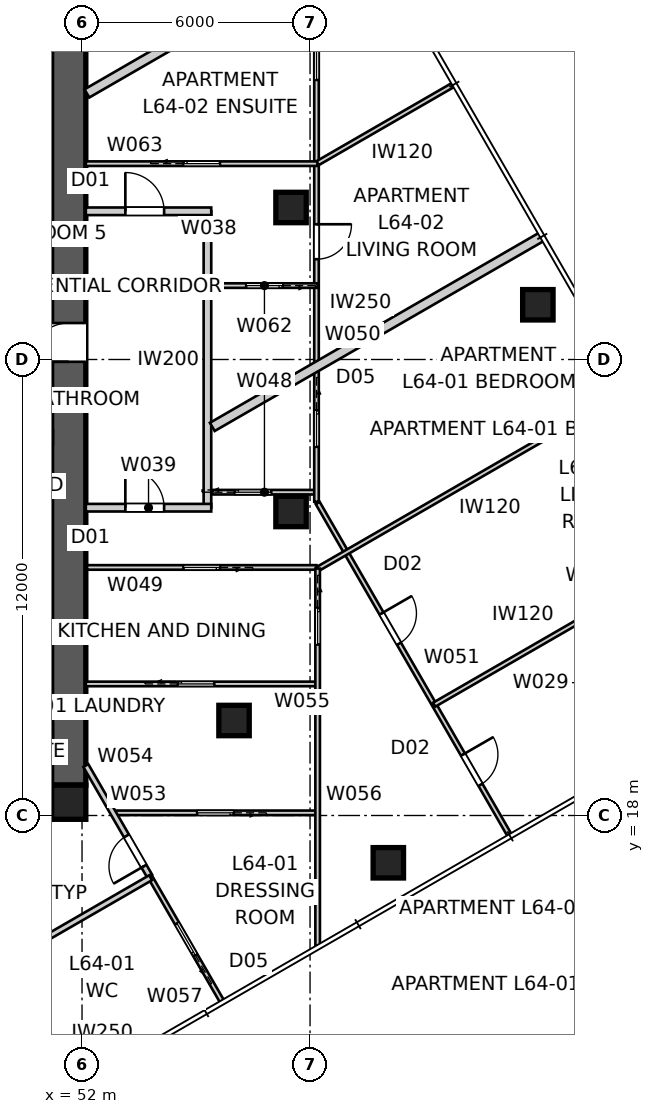
"""IFC4 building model, lengths in metres.
Left out: names, types, materials, properties, quantities, classifications, styles, units other than length and angle.
Written with IfcOpenShell. Run it as: python <this file> out.ifc"""

import sys

from ifc_helpers import new_model, si_unit, direction, frame, frame_2d, origin, origin_2d, place, context, subcontext, project, spatial, polyline, rectangle, outline, extrude, element, fill, save


model = new_model("IFC4")
c1 = context("Model", 3, precision=1e-05, world=origin(), true_north=direction((0.0, 1.0)))
c2 = subcontext(c1, "Body", "Model", "MODEL_VIEW")
j1 = project(units=[si_unit("LENGTHUNIT", "METRE"), si_unit("PLANEANGLEUNIT", "RADIAN")], contexts=[c1])
p1 = place(None, origin())
s1 = spatial("IfcSite", under=j1, at=p1, CompositionType="ELEMENT")
p2 = place(p1, origin())
s2 = spatial("IfcBuilding", under=s1, at=p2, CompositionType="ELEMENT")
p3 = place(p2, frame((0.0, 0.0, 232.0)))
s3 = spatial("IfcBuildingStorey", under=s2, at=p3, CompositionType="ELEMENT", Elevation=232.0)
p4 = place(p3, frame((51.2, 18.35, 0.0), z_axis=(0.0, 0.0, 1.0), x_axis=(-1.0, 0.0, 0.0)))
e1 = element("IfcWall", 1, at=p4, inside=s3, PredefinedType="SHEAR", context=c2, shape_type="SweptSolid", body=[
    extrude(outline(polyline([(0.0, -0.45), (22.4, -0.45), (22.4, -0.025), (22.85, -0.025), (22.85, 0.025), (22.4, 0.025), (22.4, 0.45), (0.0, 0.45), (0.0, 0.025), (-0.45, 0.025), (-0.45, -0.025), (0.0, -0.025), (0.0, -0.45)])), origin(), (0.0, 0.0, 1.0), 3.4),
])
p5 = place(p3, frame((51.65, 18.8, 0.0), z_axis=(0.0, 0.0, 1.0), x_axis=(0.0, 1.0, 0.0)))
e2 = element("IfcWall", 2, at=p5, inside=s3, PredefinedType="SHEAR", context=c2, shape_type="SweptSolid", body=[
    extrude(outline(polyline([(0.0, -0.45), (22.4, -0.45), (22.4, -0.025), (22.85, -0.025), (22.85, 0.025), (22.4, 0.025), (22.4, 0.45), (0.0, 0.45), (0.0, 0.025), (-0.45, 0.025), (-0.45, -0.025), (0.0, -0.025), (0.0, -0.45)])), origin(), (0.0, 0.0, 1.0), 3.4),
])
p6 = place(p5, frame((11.14, 0.0, 0.0)))
e3 = element("IfcOpeningElement", 3, at=p6, cuts=e2, PredefinedType="OPENING", context=c2, shape_type="SweptSolid", body=[
    extrude(rectangle(XDim=1.02, YDim=2.4, at=frame_2d((0.51, 1.2))), frame((0.0, 0.46, 0.0), z_axis=(0.0, -1.0, 0.0), x_axis=(1.0, 0.0, 0.0)), (0.0, 0.0, 1.0), 0.92),
])
p7 = place(p3, frame((51.65, 18.35, 0.0), z_axis=(0.0, 0.0, 1.0), x_axis=(1.0, 0.0, 0.0)))
e4 = element("IfcColumn", 4, at=p7, inside=s3, PredefinedType="COLUMN", context=c2, shape_type="SweptSolid", body=[
    extrude(rectangle(XDim=0.9, YDim=0.9, at=origin_2d()), origin(), (0.0, 0.0, 1.0), 3.4),
])
for number, where, z_axis, x_axis in (
    (5, (60.06, 16.755, 0.0), (0.0, 0.0, 1.0), (1.0, 0.0, 0.0)),
    (6, (63.995, 31.44, 0.0), (0.0, 0.0, 1.0), (1.0, 0.0, 0.0)),
):
    element("IfcColumn", number, at=place(p3, frame(where, z_axis=z_axis, x_axis=x_axis)), inside=s3, PredefinedType="COLUMN", context=c2, shape_type="SweptSolid", body=[
        extrude(rectangle(XDim=0.8, YDim=0.8, at=origin_2d()), origin(), (0.0, 0.0, 1.0), 3.2),
    ])
for number, where, z_axis, x_axis in (
    (7, (57.5, 26.0, 0.0), (0.0, 0.0, 1.0), (1.0, 0.0, 0.0)),
    (8, (57.5, 34.0, 0.0), (0.0, 0.0, 1.0), (1.0, 0.0, 0.0)),
    (9, (56.0, 20.5, 0.0), (0.0, 0.0, 1.0), (1.0, 0.0, 0.0)),
):
    element("IfcColumn", number, at=place(p3, frame(where, z_axis=z_axis, x_axis=x_axis)), inside=s3, PredefinedType="COLUMN", context=c2, shape_type="SweptSolid", body=[
        extrude(rectangle(XDim=0.8, YDim=0.8, at=origin_2d()), origin(), (0.0, 0.0, 1.0), 3.4),
    ])
p8 = place(p3, frame((55.3, 26.1, 0.0), z_axis=(0.0, 0.0, 1.0), x_axis=(0.0, 1.0, 0.0)))
e10 = element("IfcWall", 10, at=p8, inside=s3, PredefinedType="PARTITIONING", context=c2, shape_type="SweptSolid", body=[
    extrude(rectangle(XDim=7.8, YDim=0.2, at=frame_2d((3.9, 0.0))), origin(), (0.0, 0.0, 1.0), 3.2),
])
p9 = place(p3, frame((52.1, 33.9, 0.0), z_axis=(0.0, 0.0, 1.0), x_axis=(1.0, 0.0, 0.0)))
e11 = element("IfcWall", 11, at=p9, inside=s3, PredefinedType="PARTITIONING", context=c2, shape_type="SweptSolid", body=[
    extrude(rectangle(XDim=3.3, YDim=0.2, at=frame_2d((1.65, 0.0))), origin(), (0.0, 0.0, 1.0), 3.2),
])
p10 = place(p9, frame((1.04, 0.0, 0.0)))
e12 = element("IfcOpeningElement", 12, at=p10, cuts=e11, PredefinedType="OPENING", context=c2, shape_type="SweptSolid", body=[
    extrude(rectangle(XDim=1.02, YDim=2.34, at=frame_2d((0.51, 1.17))), frame((0.0, 0.11, 0.0), z_axis=(0.0, -1.0, 0.0), x_axis=(1.0, 0.0, 0.0)), (0.0, 0.0, 1.0), 0.22),
])
p11 = place(p3, frame((52.1, 26.1, 0.0), z_axis=(0.0, 0.0, 1.0), x_axis=(1.0, 0.0, 0.0)))
e13 = element("IfcWall", 13, at=p11, inside=s3, PredefinedType="PARTITIONING", context=c2, shape_type="SweptSolid", body=[
    extrude(rectangle(XDim=3.3, YDim=0.2, at=frame_2d((1.65, 0.0))), origin(), (0.0, 0.0, 1.0), 3.2),
])
p12 = place(p11, frame((1.04, 0.0, 0.0)))
e14 = element("IfcOpeningElement", 14, at=p12, cuts=e13, PredefinedType="OPENING", context=c2, shape_type="SweptSolid", body=[
    extrude(rectangle(XDim=1.02, YDim=2.34, at=frame_2d((0.51, 1.17))), frame((0.0, 0.11, 0.0), z_axis=(0.0, -1.0, 0.0), x_axis=(1.0, 0.0, 0.0)), (0.0, 0.0, 1.0), 0.22),
])
p13 = place(p3, frame((64.111, 33.239, 0.0), z_axis=(0.0, 0.0, 1.0), x_axis=(-0.866024190901, -0.50000210077, 0.0)))
e15 = element("IfcWall", 15, at=p13, inside=s3, PredefinedType="PARTITIONING", context=c2, shape_type="SweptSolid", body=[
    extrude(rectangle(XDim=10.026, YDim=0.25, at=frame_2d((5.013, 0.0))), origin(), (0.0, 0.0, 1.0), 3.2),
])
for number, where, z_axis, x_axis in (
    (16, (59.486, 41.25, 0.0), (0.0, 0.0, 1.0), (-0.866, -0.5, 0.0)),
    (17, (51.25, 10.514, 0.0), (0.0, 0.0, 1.0), (-0.5, 0.866, 0.0)),
):
    element("IfcWall", number, at=place(p3, frame(where, z_axis=z_axis, x_axis=x_axis)), inside=s3, PredefinedType="PARTITIONING", context=c2, shape_type="SweptSolid", body=[
        extrude(rectangle(XDim=8.496, YDim=0.25, at=frame_2d((4.248, 0.0))), origin(), (0.0, 0.0, 1.0), 3.2),
    ])
p14 = place(p3, frame((55.43, 26.508, 0.0), z_axis=(0.0, 0.0, 1.0), x_axis=(1.0, 0.0, 0.0)))
e18 = element("IfcWall", 18, at=p14, inside=s3, PredefinedType="PARTITIONING", context=c2, shape_type="SweptSolid", body=[
    extrude(rectangle(XDim=2.74, YDim=0.12, at=frame_2d((1.37, 0.0))), origin(), (0.0, 0.0, 1.0), 3.2),
])
p15 = place(p14, frame((0.59, 0.0, 0.0)))
e19 = element("IfcOpeningElement", 19, at=p15, cuts=e18, PredefinedType="OPENING", context=c2, shape_type="SweptSolid", body=[
    extrude(rectangle(XDim=0.96, YDim=2.1, at=frame_2d((0.48, 1.05))), frame((0.0, 0.07, 0.0), z_axis=(0.0, -1.0, 0.0), x_axis=(1.0, 0.0, 0.0)), (0.0, 0.0, 1.0), 0.14),
])
p16 = place(p3, frame((58.17, 24.528, 0.0), z_axis=(0.0, 0.0, 1.0), x_axis=(-1.0, 0.0, 0.0)))
e20 = element("IfcWall", 20, at=p16, inside=s3, PredefinedType="PARTITIONING", context=c2, shape_type="SweptSolid", body=[
    extrude(rectangle(XDim=6.04, YDim=0.12, at=frame_2d((3.02, 0.0))), origin(), (0.0, 0.0, 1.0), 2.3),
])
p17 = place(p16, frame((2.54, 0.0, 0.0)))
e21 = element("IfcOpeningElement", 21, at=p17, cuts=e20, PredefinedType="OPENING", context=c2, shape_type="SweptSolid", body=[
    extrude(rectangle(XDim=0.96, YDim=2.1, at=frame_2d((0.48, 1.05))), frame((0.0, 0.07, 0.0), z_axis=(0.0, -1.0, 0.0), x_axis=(1.0, 0.0, 0.0)), (0.0, 0.0, 1.0), 0.14),
])
p18 = place(p3, frame((58.171, 40.491, 0.0), z_axis=(0.0, 0.0, 1.0), x_axis=(-5.1455328e-05, -0.999999998676, 0.0)))
e22 = element("IfcWall", 22, at=p18, inside=s3, PredefinedType="PARTITIONING", context=c2, shape_type="SweptSolid", body=[
    extrude(rectangle(XDim=14.234, YDim=0.12, at=frame_2d((7.117, 0.0))), origin(), (0.0, 0.0, 1.0), 3.2),
])
p19 = place(p18, frame((6.932, 0.0, 0.0)))
e23 = element("IfcOpeningElement", 23, at=p19, cuts=e22, PredefinedType="OPENING", context=c2, shape_type="SweptSolid", body=[
    extrude(rectangle(XDim=0.92, YDim=2.34, at=frame_2d((0.46, 1.17))), frame((0.0, 0.07, 0.0), z_axis=(0.0, -1.0, 0.0), x_axis=(1.0, 0.0, 0.0)), (0.0, 0.0, 1.0), 0.14),
])
p20 = place(p18, frame((11.829, 0.0, 0.0)))
e24 = element("IfcOpeningElement", 24, at=p20, cuts=e22, PredefinedType="OPENING", context=c2, shape_type="SweptSolid", body=[
    extrude(rectangle(XDim=0.96, YDim=2.1, at=frame_2d((0.48, 1.05))), frame((0.0, 0.07, 0.0), z_axis=(0.0, -1.0, 0.0), x_axis=(1.0, 0.0, 0.0)), (0.0, 0.0, 1.0), 0.14),
])
p21 = place(p18, frame((2.174, 0.0, 0.0)))
e25 = element("IfcOpeningElement", 25, at=p21, cuts=e22, PredefinedType="OPENING", context=c2, shape_type="SweptSolid", body=[
    extrude(rectangle(XDim=0.96, YDim=2.1, at=frame_2d((0.48, 1.05))), frame((0.0, 0.07, 0.0), z_axis=(0.0, -1.0, 0.0), x_axis=(1.0, 0.0, 0.0)), (0.0, 0.0, 1.0), 0.14),
])
p22 = place(p3, frame((58.2, 26.226, 0.0), z_axis=(0.0, 0.0, 1.0), x_axis=(0.499992604493, -0.86602967354, 0.0)))
e26 = element("IfcWall", 26, at=p22, inside=s3, PredefinedType="PARTITIONING", context=c2, shape_type="SweptSolid", body=[
    extrude(rectangle(XDim=10.092, YDim=0.12, at=frame_2d((5.046, 0.0))), origin(), (0.0, 0.0, 1.0), 3.2),
])
p23 = place(p22, frame((3.359, 0.0, 0.0)))
e27 = element("IfcOpeningElement", 27, at=p23, cuts=e26, PredefinedType="OPENING", context=c2, shape_type="SweptSolid", body=[
    extrude(rectangle(XDim=0.92, YDim=2.34, at=frame_2d((0.46, 1.17))), frame((0.0, 0.07, 0.0), z_axis=(0.0, -1.0, 0.0), x_axis=(1.0, 0.0, 0.0)), (0.0, 0.0, 1.0), 0.14),
])
p24 = place(p22, frame((7.646, 0.0, 0.0)))
e28 = element("IfcOpeningElement", 28, at=p24, cuts=e26, PredefinedType="OPENING", context=c2, shape_type="SweptSolid", body=[
    extrude(rectangle(XDim=0.92, YDim=2.34, at=frame_2d((0.46, 1.17))), frame((0.0, 0.07, 0.0), z_axis=(0.0, -1.0, 0.0), x_axis=(1.0, 0.0, 0.0)), (0.0, 0.0, 1.0), 0.14),
])
p25 = place(p3, frame((66.388, 29.214, 0.0), z_axis=(0.0, 0.0, 1.0), x_axis=(-0.86602907136, -0.49999364752, 0.0)))
e29 = element("IfcWall", 29, at=p25, inside=s3, PredefinedType="PARTITIONING", context=c2, shape_type="SweptSolid", body=[
    extrude(rectangle(XDim=9.455, YDim=0.12, at=frame_2d((4.728, 0.0))), origin(), (0.0, 0.0, 1.0), 3.2),
])
p26 = place(p3, frame((58.2, 18.07, 0.0), z_axis=(0.0, 0.0, 1.0), x_axis=(-1.0, 0.0, 0.0)))
e30 = element("IfcWall", 30, at=p26, inside=s3, PredefinedType="PARTITIONING", context=c2, shape_type="SweptSolid", body=[
    extrude(rectangle(XDim=5.381, YDim=0.12, at=frame_2d((2.691, 0.0))), origin(), (0.0, 0.0, 1.0), 3.2),
])
p27 = place(p26, frame((2.211, 0.0, 0.0)))
e31 = element("IfcOpeningElement", 31, at=p27, cuts=e30, PredefinedType="OPENING", context=c2, shape_type="SweptSolid", body=[
    extrude(rectangle(XDim=0.96, YDim=2.1, at=frame_2d((0.48, 1.05))), frame((0.0, 0.07, 0.0), z_axis=(0.0, -1.0, 0.0), x_axis=(1.0, 0.0, 0.0)), (0.0, 0.0, 1.0), 0.14),
])
p28 = place(p3, frame((53.779, 16.406, 0.0), z_axis=(0.0, 0.0, 1.0), x_axis=(-0.499969954228, 0.866042750024, 0.0)))
e32 = element("IfcWall", 32, at=p28, inside=s3, PredefinedType="SOLIDWALL", context=c2, shape_type="SweptSolid", body=[
    extrude(rectangle(XDim=3.359, YDim=0.15, at=frame_2d((1.679, 0.0))), origin(), (0.0, 0.0, 1.0), 3.2),
])
p29 = place(p28, frame((0.301, 0.0, 0.0)))
e33 = element("IfcOpeningElement", 33, at=p29, cuts=e32, PredefinedType="OPENING", context=c2, shape_type="SweptSolid", body=[
    extrude(rectangle(XDim=0.92, YDim=2.0, at=frame_2d((0.46, 1.0))), frame((0.0, 0.085, 0.0), z_axis=(0.0, -1.0, 0.0), x_axis=(1.0, 0.0, 0.0)), (0.0, 0.0, 1.0), 0.17),
])
p30 = place(p3, frame((52.1, 21.462, 0.0), z_axis=(0.0, 0.0, 1.0), x_axis=(1.0, 0.0, 0.0)))
e34 = element("IfcWall", 34, at=p30, inside=s3, PredefinedType="PARTITIONING", context=c2, shape_type="SweptSolid", body=[
    extrude(rectangle(XDim=6.1, YDim=0.12, at=frame_2d((3.05, 0.0))), origin(), (0.0, 0.0, 1.0), 3.2),
])
p31 = place(p30, frame((2.42, 0.0, 0.0)))
e35 = element("IfcOpeningElement", 35, at=p31, cuts=e34, PredefinedType="OPENING", context=c2, shape_type="SweptSolid", body=[
    extrude(rectangle(XDim=0.96, YDim=2.1, at=frame_2d((0.48, 1.05))), frame((0.0, 0.07, 0.0), z_axis=(0.0, -1.0, 0.0), x_axis=(1.0, 0.0, 0.0)), (0.0, 0.0, 1.0), 0.14),
])
p32 = place(p3, frame((58.2, 24.498, 0.0), z_axis=(0.0, 0.0, 1.0), x_axis=(0.0, -1.0, 0.0)))
e36 = element("IfcWall", 36, at=p32, inside=s3, PredefinedType="PARTITIONING", context=c2, shape_type="SweptSolid", body=[
    extrude(rectangle(XDim=9.925, YDim=0.12, at=frame_2d((4.962, 0.0))), origin(), (0.0, 0.0, 1.0), 3.2),
])
p33 = place(p32, frame((1.038, 0.0, 0.0)))
e37 = element("IfcOpeningElement", 37, at=p33, cuts=e36, PredefinedType="OPENING", context=c2, shape_type="SweptSolid", body=[
    extrude(rectangle(XDim=0.96, YDim=2.1, at=frame_2d((0.48, 1.05))), frame((0.0, 0.07, 0.0), z_axis=(0.0, -1.0, 0.0), x_axis=(1.0, 0.0, 0.0)), (0.0, 0.0, 1.0), 0.14),
])
p34 = place(p3, frame((55.678, 13.117, 0.0), z_axis=(0.0, 0.0, 1.0), x_axis=(-0.500024807712, 0.866011080572, 0.0)))
e38 = element("IfcWall", 38, at=p34, inside=s3, PredefinedType="PARTITIONING", context=c2, shape_type="SweptSolid", body=[
    extrude(rectangle(XDim=3.798, YDim=0.12, at=frame_2d((1.899, 0.0))), origin(), (0.0, 0.0, 1.0), 3.2),
])
p35 = place(p34, frame((1.399, 0.0, 0.0)))
e39 = element("IfcOpeningElement", 39, at=p35, cuts=e38, PredefinedType="OPENING", context=c2, shape_type="SweptSolid", body=[
    extrude(rectangle(XDim=0.96, YDim=2.1, at=frame_2d((0.48, 1.05))), frame((0.0, 0.07, 0.0), z_axis=(0.0, -1.0, 0.0), x_axis=(1.0, 0.0, 0.0)), (0.0, 0.0, 1.0), 0.14),
])
p36 = place(p3, frame((50.289, 14.333, 0.0), z_axis=(0.0, 0.0, 1.0), x_axis=(0.866002269112, 0.500040068287, 0.0)))
e40 = element("IfcWall", 40, at=p36, inside=s3, PredefinedType="SOLIDWALL", context=c2, shape_type="SweptSolid", body=[
    extrude(rectangle(XDim=4.059, YDim=0.15, at=frame_2d((2.029, 0.0))), origin(), (0.0, 0.0, 1.0), 3.2),
])
p37 = place(p3, frame((65.237, 23.208, 0.0), z_axis=(0.0, 0.0, 1.0), x_axis=(-0.866025975094, -0.499999010461, 0.0)))
e41 = element("IfcWall", 41, at=p37, inside=s3, PredefinedType="PARTITIONING", context=c2, shape_type="SweptSolid", body=[
    extrude(rectangle(XDim=4.585, YDim=0.12, at=frame_2d((2.292, 0.0))), origin(), (0.0, 0.0, 1.0), 3.2),
])
p38 = place(p3, frame((58.2, 31.945, 0.0), z_axis=(0.0, 0.0, 1.0), x_axis=(-1.0, 0.0, 0.0)))
e42 = element("IfcWall", 42, at=p38, inside=s3, PredefinedType="PARTITIONING", context=c2, shape_type="SweptSolid", body=[
    extrude(rectangle(XDim=2.8, YDim=0.12, at=frame_2d((1.4, 0.0))), origin(), (0.0, 0.0, 1.0), 3.2),
])
p39 = place(p38, frame((0.92, 0.0, 0.0)))
e43 = element("IfcOpeningElement", 43, at=p39, cuts=e42, PredefinedType="OPENING", context=c2, shape_type="SweptSolid", body=[
    extrude(rectangle(XDim=0.96, YDim=2.1, at=frame_2d((0.48, 1.05))), frame((0.0, 0.07, 0.0), z_axis=(0.0, -1.0, 0.0), x_axis=(1.0, 0.0, 0.0)), (0.0, 0.0, 1.0), 0.14),
])
p40 = place(p3, frame((52.1, 35.153, 0.0), z_axis=(0.0, 0.0, 1.0), x_axis=(1.0, 0.0, 0.0)))
e44 = element("IfcWall", 44, at=p40, inside=s3, PredefinedType="PARTITIONING", context=c2, shape_type="SweptSolid", body=[
    extrude(rectangle(XDim=6.1, YDim=0.12, at=frame_2d((3.05, 0.0))), origin(), (0.0, 0.0, 1.0), 3.2),
])
p41 = place(p40, frame((2.57, 0.0, 0.0)))
e45 = element("IfcOpeningElement", 45, at=p41, cuts=e44, PredefinedType="OPENING", context=c2, shape_type="SweptSolid", body=[
    extrude(rectangle(XDim=0.96, YDim=2.1, at=frame_2d((0.48, 1.05))), frame((0.0, 0.07, 0.0), z_axis=(0.0, -1.0, 0.0), x_axis=(1.0, 0.0, 0.0)), (0.0, 0.0, 1.0), 0.14),
])
p42 = place(p3, frame((58.2, 35.167, 0.0), z_axis=(0.0, 0.0, 1.0), x_axis=(0.866025520146, 0.499999798456, 0.0)))
e46 = element("IfcWall", 46, at=p42, inside=s3, PredefinedType="PARTITIONING", context=c2, shape_type="SweptSolid", body=[
    extrude(rectangle(XDim=4.115, YDim=0.12, at=frame_2d((2.057, 0.0))), origin(), (0.0, 0.0, 1.0), 3.2),
])
p43 = place(p12, origin())
e47 = element("IfcDoor", 47, at=p43, inside=s3, OperationType="SINGLE_SWING_LEFT", PredefinedType="DOOR", context=c2, shape_type="SweptSolid", body=[
    extrude(rectangle(XDim=1.02, YDim=2.34, at=frame_2d((0.51, 1.17))), frame((0.0, 0.025, 0.0), z_axis=(0.0, -1.0, 0.0), x_axis=(1.0, 0.0, 0.0)), (0.0, 0.0, 1.0), 0.05),
])
fill(e14, e47)
p44 = place(p10, origin())
e48 = element("IfcDoor", 48, at=p44, inside=s3, OperationType="SINGLE_SWING_LEFT", PredefinedType="DOOR", context=c2, shape_type="SweptSolid", body=[
    extrude(rectangle(XDim=1.02, YDim=2.34, at=frame_2d((0.51, 1.17))), frame((0.0, 0.025, 0.0), z_axis=(0.0, -1.0, 0.0), x_axis=(1.0, 0.0, 0.0)), (0.0, 0.0, 1.0), 0.05),
])
fill(e12, e48)
p45 = place(p17, origin())
e49 = element("IfcDoor", 49, at=p45, inside=s3, OperationType="SLIDING_TO_LEFT", PredefinedType="DOOR", context=c2, shape_type="SweptSolid", body=[
    extrude(rectangle(XDim=0.96, YDim=2.1, at=frame_2d((0.48, 1.05))), frame((0.0, 0.025, 0.0), z_axis=(0.0, -1.0, 0.0), x_axis=(1.0, 0.0, 0.0)), (0.0, 0.0, 1.0), 0.05),
])
fill(e21, e49)
p46 = place(p15, origin())
e50 = element("IfcDoor", 50, at=p46, inside=s3, OperationType="SLIDING_TO_LEFT", PredefinedType="DOOR", context=c2, shape_type="SweptSolid", body=[
    extrude(rectangle(XDim=0.96, YDim=2.1, at=frame_2d((0.48, 1.05))), frame((0.0, 0.025, 0.0), z_axis=(0.0, -1.0, 0.0), x_axis=(1.0, 0.0, 0.0)), (0.0, 0.0, 1.0), 0.05),
])
fill(e19, e50)
p47 = place(p41, origin())
e51 = element("IfcDoor", 51, at=p47, inside=s3, OperationType="SLIDING_TO_LEFT", PredefinedType="DOOR", context=c2, shape_type="SweptSolid", body=[
    extrude(rectangle(XDim=0.96, YDim=2.1, at=frame_2d((0.48, 1.05))), frame((0.0, 0.025, 0.0), z_axis=(0.0, -1.0, 0.0), x_axis=(1.0, 0.0, 0.0)), (0.0, 0.0, 1.0), 0.05),
])
fill(e45, e51)
p48 = place(p19, origin())
e52 = element("IfcDoor", 52, at=p48, inside=s3, OperationType="SINGLE_SWING_LEFT", PredefinedType="DOOR", context=c2, shape_type="SweptSolid", body=[
    extrude(rectangle(XDim=0.92, YDim=2.34, at=frame_2d((0.46, 1.17))), frame((0.0, 0.025, 0.0), z_axis=(0.0, -1.0, 0.0), x_axis=(1.0, 0.0, 0.0)), (0.0, 0.0, 1.0), 0.05),
])
fill(e23, e52)
p49 = place(p39, origin())
e53 = element("IfcDoor", 53, at=p49, inside=s3, OperationType="SLIDING_TO_LEFT", PredefinedType="DOOR", context=c2, shape_type="SweptSolid", body=[
    extrude(rectangle(XDim=0.96, YDim=2.1, at=frame_2d((0.48, 1.05))), frame((0.0, 0.025, 0.0), z_axis=(0.0, -1.0, 0.0), x_axis=(1.0, 0.0, 0.0)), (0.0, 0.0, 1.0), 0.05),
])
fill(e43, e53)
p50 = place(p31, origin())
e54 = element("IfcDoor", 54, at=p50, inside=s3, OperationType="SLIDING_TO_LEFT", PredefinedType="DOOR", context=c2, shape_type="SweptSolid", body=[
    extrude(rectangle(XDim=0.96, YDim=2.1, at=frame_2d((0.48, 1.05))), frame((0.0, 0.025, 0.0), z_axis=(0.0, -1.0, 0.0), x_axis=(1.0, 0.0, 0.0)), (0.0, 0.0, 1.0), 0.05),
])
fill(e35, e54)
p51 = place(p33, origin())
e55 = element("IfcDoor", 55, at=p51, inside=s3, OperationType="SLIDING_TO_LEFT", PredefinedType="DOOR", context=c2, shape_type="SweptSolid", body=[
    extrude(rectangle(XDim=0.96, YDim=2.1, at=frame_2d((0.48, 1.05))), frame((0.0, 0.025, 0.0), z_axis=(0.0, -1.0, 0.0), x_axis=(1.0, 0.0, 0.0)), (0.0, 0.0, 1.0), 0.05),
])
fill(e37, e55)
p52 = place(p20, origin())
e56 = element("IfcDoor", 56, at=p52, inside=s3, OperationType="SLIDING_TO_LEFT", PredefinedType="DOOR", context=c2, shape_type="SweptSolid", body=[
    extrude(rectangle(XDim=0.96, YDim=2.1, at=frame_2d((0.48, 1.05))), frame((0.0, 0.025, 0.0), z_axis=(0.0, -1.0, 0.0), x_axis=(1.0, 0.0, 0.0)), (0.0, 0.0, 1.0), 0.05),
])
fill(e24, e56)
p53 = place(p21, origin())
e57 = element("IfcDoor", 57, at=p53, inside=s3, OperationType="SLIDING_TO_LEFT", PredefinedType="DOOR", context=c2, shape_type="SweptSolid", body=[
    extrude(rectangle(XDim=0.96, YDim=2.1, at=frame_2d((0.48, 1.05))), frame((0.0, 0.025, 0.0), z_axis=(0.0, -1.0, 0.0), x_axis=(1.0, 0.0, 0.0)), (0.0, 0.0, 1.0), 0.05),
])
fill(e25, e57)
p54 = place(p27, origin())
e58 = element("IfcDoor", 58, at=p54, inside=s3, OperationType="SLIDING_TO_LEFT", PredefinedType="DOOR", context=c2, shape_type="SweptSolid", body=[
    extrude(rectangle(XDim=0.96, YDim=2.1, at=frame_2d((0.48, 1.05))), frame((0.0, 0.025, 0.0), z_axis=(0.0, -1.0, 0.0), x_axis=(1.0, 0.0, 0.0)), (0.0, 0.0, 1.0), 0.05),
])
fill(e31, e58)
p55 = place(p35, origin())
e59 = element("IfcDoor", 59, at=p55, inside=s3, OperationType="SLIDING_TO_LEFT", PredefinedType="DOOR", context=c2, shape_type="SweptSolid", body=[
    extrude(rectangle(XDim=0.96, YDim=2.1, at=frame_2d((0.48, 1.05))), frame((0.0, 0.025, 0.0), z_axis=(0.0, -1.0, 0.0), x_axis=(1.0, 0.0, 0.0)), (0.0, 0.0, 1.0), 0.05),
])
fill(e39, e59)
p56 = place(p29, origin())
e60 = element("IfcDoor", 60, at=p56, inside=s3, OperationType="SINGLE_SWING_LEFT", PredefinedType="DOOR", context=c2, shape_type="SweptSolid", body=[
    extrude(rectangle(XDim=0.92, YDim=2.0, at=frame_2d((0.46, 1.0))), frame((0.0, 0.025, 0.0), z_axis=(0.0, -1.0, 0.0), x_axis=(1.0, 0.0, 0.0)), (0.0, 0.0, 1.0), 0.05),
])
fill(e33, e60)
p57 = place(p23, origin())
e61 = element("IfcDoor", 61, at=p57, inside=s3, OperationType="SINGLE_SWING_LEFT", PredefinedType="DOOR", context=c2, shape_type="SweptSolid", body=[
    extrude(rectangle(XDim=0.92, YDim=2.34, at=frame_2d((0.46, 1.17))), frame((0.0, 0.025, 0.0), z_axis=(0.0, -1.0, 0.0), x_axis=(1.0, 0.0, 0.0)), (0.0, 0.0, 1.0), 0.05),
])
fill(e27, e61)
p58 = place(p24, origin())
e62 = element("IfcDoor", 62, at=p58, inside=s3, OperationType="SINGLE_SWING_LEFT", PredefinedType="DOOR", context=c2, shape_type="SweptSolid", body=[
    extrude(rectangle(XDim=0.92, YDim=2.34, at=frame_2d((0.46, 1.17))), frame((0.0, 0.025, 0.0), z_axis=(0.0, -1.0, 0.0), x_axis=(1.0, 0.0, 0.0)), (0.0, 0.0, 1.0), 0.05),
])
fill(e28, e62)
p59 = place(p6, origin())
e63 = element("IfcDoor", 63, at=p59, inside=s3, OperationType="SINGLE_SWING_LEFT", PredefinedType="DOOR", context=c2, shape_type="SweptSolid", body=[
    extrude(rectangle(XDim=1.02, YDim=2.4, at=frame_2d((0.51, 1.2))), frame((0.0, 0.025, 0.0), z_axis=(0.0, -1.0, 0.0), x_axis=(1.0, 0.0, 0.0)), (0.0, 0.0, 1.0), 0.05),
])
fill(e3, e63)
save(model, sys.argv[1])
